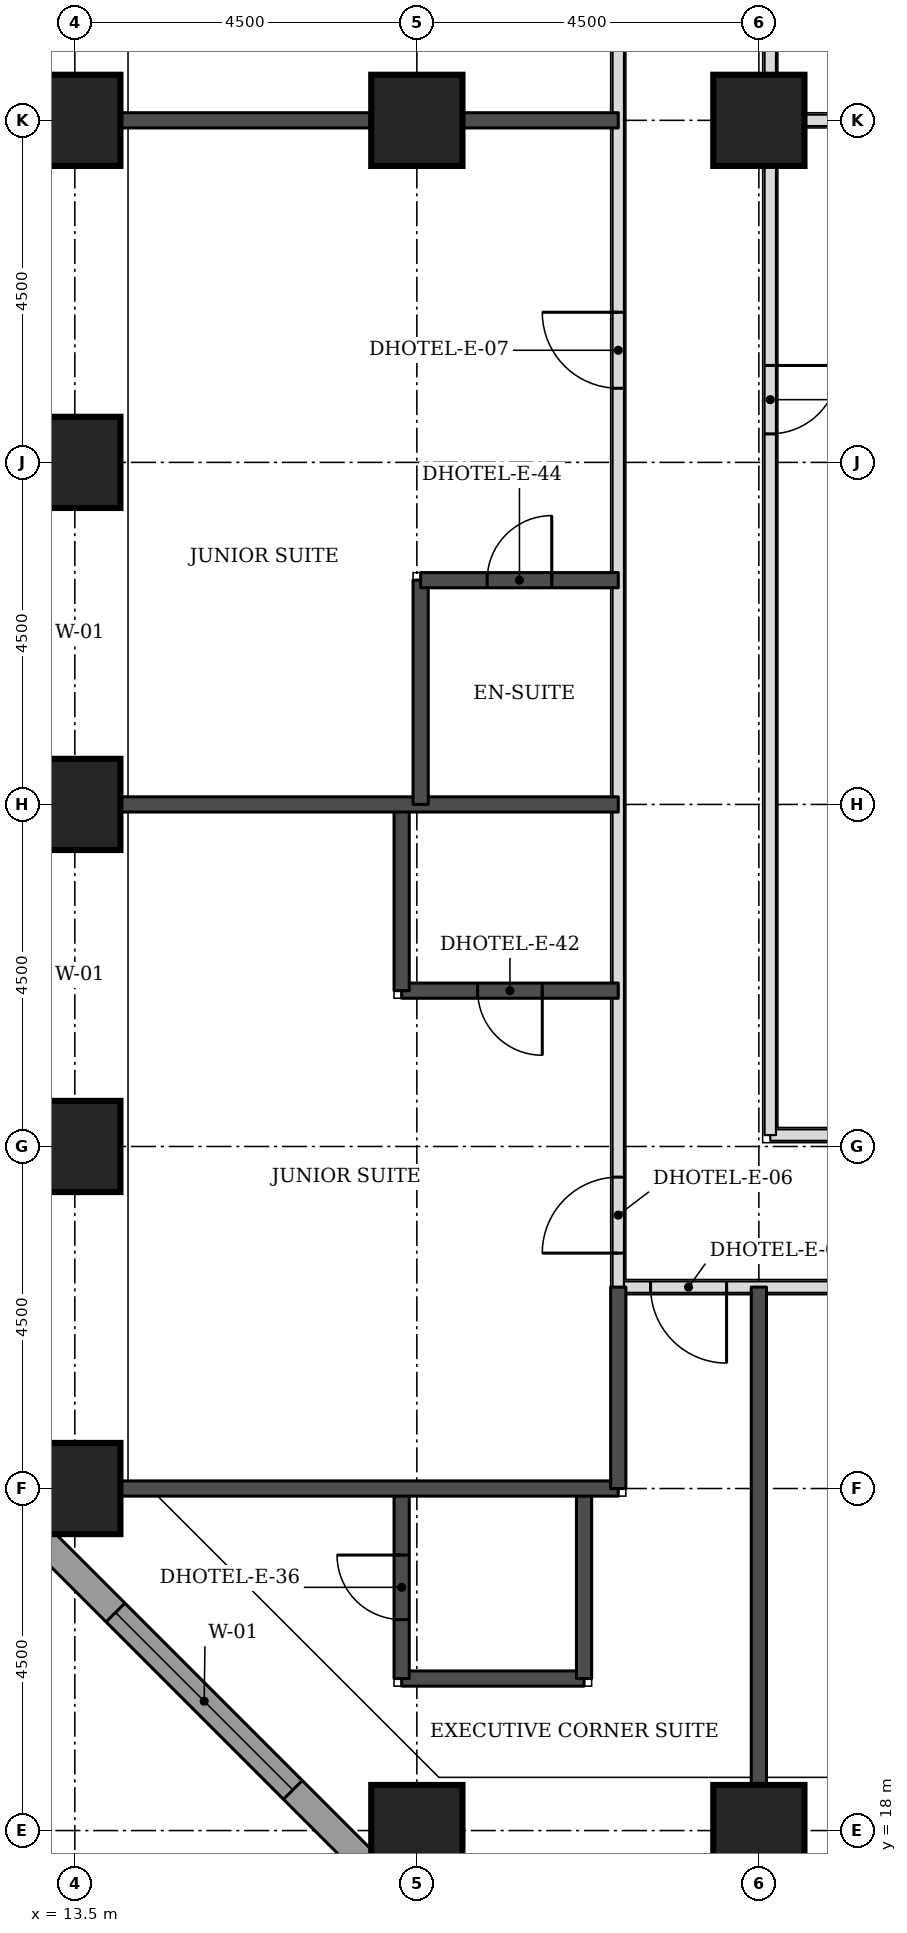
"""IFC4 building model, lengths in metres.
Left out: names, types, materials, properties, quantities, classifications, styles, units other than length and angle.
Written with IfcOpenShell. Run it as: python <this file> out.ifc"""

import sys

from ifc_helpers import new_model, si_unit, direction, frame, frame_2d, origin, origin_2d, place, context, subcontext, project, spatial, rectangle, extrude, element, fill, save


model = new_model("IFC4")
c1 = context("Model", 3, precision=1e-05, world=origin(), true_north=direction((0.0, 1.0)))
c2 = subcontext(c1, "Body", "Model", "MODEL_VIEW")
j1 = project(units=[si_unit("LENGTHUNIT", "METRE"), si_unit("PLANEANGLEUNIT", "RADIAN")], contexts=[c1])
p1 = place(None, origin())
s1 = spatial("IfcSite", under=j1, at=p1, CompositionType="ELEMENT")
p2 = place(p1, origin())
s2 = spatial("IfcBuilding", under=s1, at=p2, CompositionType="ELEMENT")
p3 = place(p2, frame((0.0, 0.0, 39.6)))
s3 = spatial("IfcBuildingStorey", under=s2, at=p3, CompositionType="ELEMENT", Elevation=39.6)
for number, where, z_axis, x_axis in (
    (1, (18.0, 18.0, 0.0), (0.0, 0.0, 1.0), (1.0, 0.0, 0.0)),
    (2, (22.5, 18.0, 0.0), (0.0, 0.0, 1.0), (1.0, 0.0, 0.0)),
    (3, (13.5, 22.5, 0.0), (0.0, 0.0, 1.0), (1.0, 0.0, 0.0)),
    (4, (13.5, 27.0, 0.0), (0.0, 0.0, 1.0), (1.0, 0.0, 0.0)),
    (5, (13.5, 31.5, 0.0), (0.0, 0.0, 1.0), (1.0, 0.0, 0.0)),
    (6, (13.5, 36.0, 0.0), (0.0, 0.0, 1.0), (1.0, 0.0, 0.0)),
    (7, (13.5, 40.5, 0.0), (0.0, 0.0, 1.0), (1.0, 0.0, 0.0)),
    (8, (18.0, 40.5, 0.0), (0.0, 0.0, 1.0), (1.0, 0.0, 0.0)),
    (9, (22.5, 40.5, 0.0), (0.0, 0.0, 1.0), (1.0, 0.0, 0.0)),
):
    element("IfcColumn", number, at=place(p3, frame(where, z_axis=z_axis, x_axis=x_axis)), inside=s3, PredefinedType="COLUMN", context=c2, shape_type="SweptSolid", body=[
        extrude(rectangle(XDim=1.2, YDim=1.2, at=origin_2d()), origin(), (0.0, 0.0, 1.0), 3.3),
    ])
p4 = place(p3, frame((12.674, 22.23, 0.0), z_axis=(0.0, 0.0, 1.0), x_axis=(0.707106781187, -0.707106781187, 0.0)))
e10 = element("IfcWall", 10, at=p4, inside=s3, PredefinedType="STANDARD", context=c2, shape_type="SweptSolid", body=[
    extrude(rectangle(XDim=7.151, YDim=0.35, at=frame_2d((3.576, 0.0))), origin(), (0.0, 0.0, 1.0), 3.055),
])
p5 = place(p4, frame((1.926, 0.0, 0.8)))
e11 = element("IfcOpeningElement", 11, at=p5, cuts=e10, PredefinedType="OPENING", context=c2, shape_type="SweptSolid", body=[
    extrude(rectangle(XDim=3.3, YDim=1.5, at=frame_2d((1.65, 0.75))), frame((0.0, 0.185, 0.0), z_axis=(0.0, -1.0, 0.0), x_axis=(1.0, 0.0, 0.0)), (0.0, 0.0, 1.0), 0.37),
])
p6 = place(p3, frame((20.65, 25.15, 0.0), z_axis=(0.0, 0.0, 1.0), x_axis=(1.0, 0.0, 0.0)))
e12 = element("IfcWall", 12, at=p6, inside=s3, PredefinedType="PARTITIONING", context=c2, shape_type="SweptSolid", body=[
    extrude(rectangle(XDim=32.2, YDim=0.15, at=frame_2d((16.1, 0.0))), origin(), (0.0, 0.0, 1.0), 3.08),
])
p7 = place(p6, frame((4.375, 0.0, 0.0)))
e13 = element("IfcOpeningElement", 13, at=p7, cuts=e12, PredefinedType="OPENING", context=c2, shape_type="SweptSolid", body=[
    extrude(rectangle(XDim=1.0, YDim=2.1, at=frame_2d((0.5, 1.05))), frame((0.0, 0.085, 0.0), z_axis=(0.0, -1.0, 0.0), x_axis=(1.0, 0.0, 0.0)), (0.0, 0.0, 1.0), 0.17),
])
p8 = place(p6, frame((16.075, 0.0, 0.0)))
e14 = element("IfcOpeningElement", 14, at=p8, cuts=e12, PredefinedType="OPENING", context=c2, shape_type="SweptSolid", body=[
    extrude(rectangle(XDim=1.0, YDim=2.1, at=frame_2d((0.5, 1.05))), frame((0.0, 0.085, 0.0), z_axis=(0.0, -1.0, 0.0), x_axis=(1.0, 0.0, 0.0)), (0.0, 0.0, 1.0), 0.17),
])
p9 = place(p6, frame((22.375, 0.0, 0.0)))
e15 = element("IfcOpeningElement", 15, at=p9, cuts=e12, PredefinedType="OPENING", context=c2, shape_type="SweptSolid", body=[
    extrude(rectangle(XDim=1.0, YDim=2.1, at=frame_2d((0.5, 1.05))), frame((0.0, 0.085, 0.0), z_axis=(0.0, -1.0, 0.0), x_axis=(1.0, 0.0, 0.0)), (0.0, 0.0, 1.0), 0.17),
])
p10 = place(p6, frame((0.425, 0.0, 0.0)))
e16 = element("IfcOpeningElement", 16, at=p10, cuts=e12, PredefinedType="OPENING", context=c2, shape_type="SweptSolid", body=[
    extrude(rectangle(XDim=1.0, YDim=2.1, at=frame_2d((0.5, 1.05))), frame((0.0, 0.085, 0.0), z_axis=(0.0, -1.0, 0.0), x_axis=(1.0, 0.0, 0.0)), (0.0, 0.0, 1.0), 0.17),
])
p11 = place(p6, frame((30.025, 0.0, 0.0)))
e17 = element("IfcOpeningElement", 17, at=p11, cuts=e12, PredefinedType="OPENING", context=c2, shape_type="SweptSolid", body=[
    extrude(rectangle(XDim=1.0, YDim=2.1, at=frame_2d((0.5, 1.05))), frame((0.0, 0.085, 0.0), z_axis=(0.0, -1.0, 0.0), x_axis=(1.0, 0.0, 0.0)), (0.0, 0.0, 1.0), 0.17),
])
p12 = place(p3, frame((20.65, 25.15, 0.0), z_axis=(0.0, 0.0, 1.0), x_axis=(0.0, 1.0, 0.0)))
e18 = element("IfcWall", 18, at=p12, inside=s3, PredefinedType="PARTITIONING", context=c2, shape_type="SweptSolid", body=[
    extrude(rectangle(XDim=24.35, YDim=0.15, at=frame_2d((12.175, 0.0))), origin(), (0.0, 0.0, 1.0), 3.08),
])
p13 = place(p12, frame((0.447, 0.0, 0.0)))
e19 = element("IfcOpeningElement", 19, at=p13, cuts=e18, PredefinedType="OPENING", context=c2, shape_type="SweptSolid", body=[
    extrude(rectangle(XDim=1.0, YDim=2.1, at=frame_2d((0.5, 1.05))), frame((0.0, 0.085, 0.0), z_axis=(0.0, -1.0, 0.0), x_axis=(1.0, 0.0, 0.0)), (0.0, 0.0, 1.0), 0.17),
])
p14 = place(p12, frame((11.825, 0.0, 0.0)))
e20 = element("IfcOpeningElement", 20, at=p14, cuts=e18, PredefinedType="OPENING", context=c2, shape_type="SweptSolid", body=[
    extrude(rectangle(XDim=1.0, YDim=2.1, at=frame_2d((0.5, 1.05))), frame((0.0, 0.085, 0.0), z_axis=(0.0, -1.0, 0.0), x_axis=(1.0, 0.0, 0.0)), (0.0, 0.0, 1.0), 0.17),
])
p15 = place(p12, frame((18.125, 0.0, 0.0)))
e21 = element("IfcOpeningElement", 21, at=p15, cuts=e18, PredefinedType="OPENING", context=c2, shape_type="SweptSolid", body=[
    extrude(rectangle(XDim=1.0, YDim=2.1, at=frame_2d((0.5, 1.05))), frame((0.0, 0.085, 0.0), z_axis=(0.0, -1.0, 0.0), x_axis=(1.0, 0.0, 0.0)), (0.0, 0.0, 1.0), 0.17),
])
p16 = place(p3, frame((22.65, 27.15, 0.0), z_axis=(0.0, 0.0, 1.0), x_axis=(1.0, 0.0, 0.0)))
e22 = element("IfcWall", 22, at=p16, inside=s3, PredefinedType="PARTITIONING", context=c2, shape_type="SweptSolid", body=[
    extrude(rectangle(XDim=1.95, YDim=0.15, at=frame_2d((0.975, 0.0))), origin(), (0.0, 0.0, 1.0), 3.08),
])
p17 = place(p3, frame((22.65, 27.15, 0.0), z_axis=(0.0, 0.0, 1.0), x_axis=(0.0, 1.0, 0.0)))
e23 = element("IfcWall", 23, at=p17, inside=s3, PredefinedType="PARTITIONING", context=c2, shape_type="SweptSolid", body=[
    extrude(rectangle(XDim=15.85, YDim=0.15, at=frame_2d((7.925, 0.0))), origin(), (0.0, 0.0, 1.0), 3.08),
])
p18 = place(p17, frame((9.225, 0.0, 0.0)))
e24 = element("IfcOpeningElement", 24, at=p18, cuts=e23, PredefinedType="OPENING", context=c2, shape_type="SweptSolid", body=[
    extrude(rectangle(XDim=0.9, YDim=2.1, at=frame_2d((0.45, 1.05))), frame((0.0, 0.085, 0.0), z_axis=(0.0, -1.0, 0.0), x_axis=(1.0, 0.0, 0.0)), (0.0, 0.0, 1.0), 0.17),
])
p19 = place(p3, frame((22.5, 18.6, 0.0), z_axis=(0.0, 0.0, 1.0), x_axis=(0.0, 1.0, 0.0)))
e25 = element("IfcWall", 25, at=p19, inside=s3, PredefinedType="SOLIDWALL", context=c2, shape_type="SweptSolid", body=[
    extrude(rectangle(XDim=6.55, YDim=0.2, at=frame_2d((3.275, 0.0))), origin(), (0.0, 0.0, 1.0), 3.08),
])
p20 = place(p3, frame((17.8, 20.0, 0.0), z_axis=(0.0, 0.0, 1.0), x_axis=(1.0, 0.0, 0.0)))
e26 = element("IfcWall", 26, at=p20, inside=s3, PredefinedType="SOLIDWALL", context=c2, shape_type="SweptSolid", body=[
    extrude(rectangle(XDim=2.4, YDim=0.2, at=frame_2d((1.2, 0.0))), origin(), (0.0, 0.0, 1.0), 3.08),
])
p21 = place(p3, frame((17.8, 20.0, 0.0), z_axis=(0.0, 0.0, 1.0), x_axis=(0.0, 1.0, 0.0)))
e27 = element("IfcWall", 27, at=p21, inside=s3, PredefinedType="SOLIDWALL", context=c2, shape_type="SweptSolid", body=[
    extrude(rectangle(XDim=2.5, YDim=0.2, at=frame_2d((1.25, 0.0))), origin(), (0.0, 0.0, 1.0), 3.08),
])
p22 = place(p21, frame((0.775, 0.0, 0.0)))
e28 = element("IfcOpeningElement", 28, at=p22, cuts=e27, PredefinedType="OPENING", context=c2, shape_type="SweptSolid", body=[
    extrude(rectangle(XDim=0.85, YDim=2.1, at=frame_2d((0.425, 1.05))), frame((0.0, 0.11, 0.0), z_axis=(0.0, -1.0, 0.0), x_axis=(1.0, 0.0, 0.0)), (0.0, 0.0, 1.0), 0.22),
])
p23 = place(p3, frame((20.2, 20.0, 0.0), z_axis=(0.0, 0.0, 1.0), x_axis=(0.0, 1.0, 0.0)))
e29 = element("IfcWall", 29, at=p23, inside=s3, PredefinedType="SOLIDWALL", context=c2, shape_type="SweptSolid", body=[
    extrude(rectangle(XDim=2.5, YDim=0.2, at=frame_2d((1.25, 0.0))), origin(), (0.0, 0.0, 1.0), 3.08),
])
p24 = place(p3, frame((14.1, 22.5, 0.0), z_axis=(0.0, 0.0, 1.0), x_axis=(1.0, 0.0, 0.0)))
e30 = element("IfcWall", 30, at=p24, inside=s3, PredefinedType="SOLIDWALL", context=c2, shape_type="SweptSolid", body=[
    extrude(rectangle(XDim=6.55, YDim=0.2, at=frame_2d((3.275, 0.0))), origin(), (0.0, 0.0, 1.0), 3.08),
])
p25 = place(p3, frame((20.65, 22.5, 0.0), z_axis=(0.0, 0.0, 1.0), x_axis=(0.0, 1.0, 0.0)))
e31 = element("IfcWall", 31, at=p25, inside=s3, PredefinedType="SOLIDWALL", context=c2, shape_type="SweptSolid", body=[
    extrude(rectangle(XDim=2.65, YDim=0.2, at=frame_2d((1.325, 0.0))), origin(), (0.0, 0.0, 1.0), 3.08),
])
p26 = place(p3, frame((17.8, 29.05, 0.0), z_axis=(0.0, 0.0, 1.0), x_axis=(1.0, 0.0, 0.0)))
e32 = element("IfcWall", 32, at=p26, inside=s3, PredefinedType="SOLIDWALL", context=c2, shape_type="SweptSolid", body=[
    extrude(rectangle(XDim=2.85, YDim=0.2, at=frame_2d((1.425, 0.0))), origin(), (0.0, 0.0, 1.0), 3.08),
])
p27 = place(p26, frame((1.0, 0.0, 0.0)))
e33 = element("IfcOpeningElement", 33, at=p27, cuts=e32, PredefinedType="OPENING", context=c2, shape_type="SweptSolid", body=[
    extrude(rectangle(XDim=0.85, YDim=2.1, at=frame_2d((0.425, 1.05))), frame((0.0, 0.11, 0.0), z_axis=(0.0, -1.0, 0.0), x_axis=(1.0, 0.0, 0.0)), (0.0, 0.0, 1.0), 0.22),
])
p28 = place(p3, frame((17.8, 29.05, 0.0), z_axis=(0.0, 0.0, 1.0), x_axis=(0.0, 1.0, 0.0)))
e34 = element("IfcWall", 34, at=p28, inside=s3, PredefinedType="SOLIDWALL", context=c2, shape_type="SweptSolid", body=[
    extrude(rectangle(XDim=2.45, YDim=0.2, at=frame_2d((1.225, 0.0))), origin(), (0.0, 0.0, 1.0), 3.08),
])
p29 = place(p3, frame((14.1, 31.5, 0.0), z_axis=(0.0, 0.0, 1.0), x_axis=(1.0, 0.0, 0.0)))
e35 = element("IfcWall", 35, at=p29, inside=s3, PredefinedType="SOLIDWALL", context=c2, shape_type="SweptSolid", body=[
    extrude(rectangle(XDim=6.55, YDim=0.2, at=frame_2d((3.275, 0.0))), origin(), (0.0, 0.0, 1.0), 3.08),
])
p30 = place(p3, frame((18.05, 31.5, 0.0), z_axis=(0.0, 0.0, 1.0), x_axis=(0.0, 1.0, 0.0)))
e36 = element("IfcWall", 36, at=p30, inside=s3, PredefinedType="SOLIDWALL", context=c2, shape_type="SweptSolid", body=[
    extrude(rectangle(XDim=2.95, YDim=0.2, at=frame_2d((1.475, 0.0))), origin(), (0.0, 0.0, 1.0), 3.08),
])
p31 = place(p3, frame((18.05, 34.45, 0.0), z_axis=(0.0, 0.0, 1.0), x_axis=(1.0, 0.0, 0.0)))
e37 = element("IfcWall", 37, at=p31, inside=s3, PredefinedType="SOLIDWALL", context=c2, shape_type="SweptSolid", body=[
    extrude(rectangle(XDim=2.6, YDim=0.2, at=frame_2d((1.3, 0.0))), origin(), (0.0, 0.0, 1.0), 3.08),
])
p32 = place(p31, frame((0.875, 0.0, 0.0)))
e38 = element("IfcOpeningElement", 38, at=p32, cuts=e37, PredefinedType="OPENING", context=c2, shape_type="SweptSolid", body=[
    extrude(rectangle(XDim=0.85, YDim=2.1, at=frame_2d((0.425, 1.05))), frame((0.0, 0.11, 0.0), z_axis=(0.0, -1.0, 0.0), x_axis=(1.0, 0.0, 0.0)), (0.0, 0.0, 1.0), 0.22),
])
p33 = place(p3, frame((14.1, 40.5, 0.0), z_axis=(0.0, 0.0, 1.0), x_axis=(1.0, 0.0, 0.0)))
e39 = element("IfcWall", 39, at=p33, inside=s3, PredefinedType="SOLIDWALL", context=c2, shape_type="SweptSolid", body=[
    extrude(rectangle(XDim=6.55, YDim=0.2, at=frame_2d((3.275, 0.0))), origin(), (0.0, 0.0, 1.0), 3.08),
])
p34 = place(p3, frame((22.65, 40.5, 0.0), z_axis=(0.0, 0.0, 1.0), x_axis=(1.0, 0.0, 0.0)))
e40 = element("IfcWall", 40, at=p34, inside=s3, PredefinedType="PARTITIONING", context=c2, shape_type="SweptSolid", body=[
    extrude(rectangle(XDim=1.95, YDim=0.15, at=frame_2d((0.975, 0.0))), origin(), (0.0, 0.0, 1.0), 2.33),
])
p35 = place(p5, origin())
e41 = element("IfcWindow", 41, at=p35, inside=s3, PartitioningType="SINGLE_PANEL", PredefinedType="WINDOW", context=c2, shape_type="SweptSolid", body=[
    extrude(rectangle(XDim=3.3, YDim=1.5, at=frame_2d((1.65, 0.75))), frame((0.0, 0.085, 0.0), z_axis=(0.0, -1.0, 0.0), x_axis=(1.0, 0.0, 0.0)), (0.0, 0.0, 1.0), 0.06),
])
fill(e11, e41)
p36 = place(p13, origin())
e42 = element("IfcDoor", 42, at=p36, inside=s3, OperationType="SINGLE_SWING_LEFT", PredefinedType="DOOR", context=c2, shape_type="SweptSolid", body=[
    extrude(rectangle(XDim=1.0, YDim=2.1, at=frame_2d((0.5, 1.05))), frame((0.0, 0.025, 0.0), z_axis=(0.0, -1.0, 0.0), x_axis=(1.0, 0.0, 0.0)), (0.0, 0.0, 1.0), 0.05),
])
fill(e19, e42)
p37 = place(p27, frame((0.85, 0.0, 0.0), z_axis=(0.0, 0.0, 1.0), x_axis=(-1.0, 0.0, 0.0)))
e43 = element("IfcDoor", 43, at=p37, inside=s3, OperationType="SINGLE_SWING_LEFT", PredefinedType="DOOR", context=c2, shape_type="SweptSolid", body=[
    extrude(rectangle(XDim=0.85, YDim=2.1, at=frame_2d((0.425, 1.05))), frame((0.0, 0.025, 0.0), z_axis=(0.0, -1.0, 0.0), x_axis=(1.0, 0.0, 0.0)), (0.0, 0.0, 1.0), 0.05),
])
fill(e33, e43)
p38 = place(p14, origin())
e44 = element("IfcDoor", 44, at=p38, inside=s3, OperationType="SINGLE_SWING_RIGHT", PredefinedType="DOOR", context=c2, shape_type="SweptSolid", body=[
    extrude(rectangle(XDim=1.0, YDim=2.1, at=frame_2d((0.5, 1.05))), frame((0.0, 0.025, 0.0), z_axis=(0.0, -1.0, 0.0), x_axis=(1.0, 0.0, 0.0)), (0.0, 0.0, 1.0), 0.05),
])
fill(e20, e44)
p39 = place(p32, origin())
e45 = element("IfcDoor", 45, at=p39, inside=s3, OperationType="SINGLE_SWING_RIGHT", PredefinedType="DOOR", context=c2, shape_type="SweptSolid", body=[
    extrude(rectangle(XDim=0.85, YDim=2.1, at=frame_2d((0.425, 1.05))), frame((0.0, 0.025, 0.0), z_axis=(0.0, -1.0, 0.0), x_axis=(1.0, 0.0, 0.0)), (0.0, 0.0, 1.0), 0.05),
])
fill(e38, e45)
p40 = place(p10, frame((1.0, 0.0, 0.0), z_axis=(0.0, 0.0, 1.0), x_axis=(-1.0, 0.0, 0.0)))
e46 = element("IfcDoor", 46, at=p40, inside=s3, OperationType="SINGLE_SWING_LEFT", PredefinedType="DOOR", context=c2, shape_type="SweptSolid", body=[
    extrude(rectangle(XDim=1.0, YDim=2.1, at=frame_2d((0.5, 1.05))), frame((0.0, 0.025, 0.0), z_axis=(0.0, -1.0, 0.0), x_axis=(1.0, 0.0, 0.0)), (0.0, 0.0, 1.0), 0.05),
])
fill(e16, e46)
p41 = place(p22, origin())
e47 = element("IfcDoor", 47, at=p41, inside=s3, OperationType="SINGLE_SWING_RIGHT", PredefinedType="DOOR", context=c2, shape_type="SweptSolid", body=[
    extrude(rectangle(XDim=0.85, YDim=2.1, at=frame_2d((0.425, 1.05))), frame((0.0, 0.025, 0.0), z_axis=(0.0, -1.0, 0.0), x_axis=(1.0, 0.0, 0.0)), (0.0, 0.0, 1.0), 0.05),
])
fill(e28, e47)
p42 = place(p18, frame((0.9, 0.0, 0.0), z_axis=(0.0, 0.0, 1.0), x_axis=(-1.0, 0.0, 0.0)))
e48 = element("IfcDoor", 48, at=p42, inside=s3, OperationType="SINGLE_SWING_LEFT", PredefinedType="DOOR", context=c2, shape_type="SweptSolid", body=[
    extrude(rectangle(XDim=0.9, YDim=2.1, at=frame_2d((0.45, 1.05))), frame((0.0, 0.025, 0.0), z_axis=(0.0, -1.0, 0.0), x_axis=(1.0, 0.0, 0.0)), (0.0, 0.0, 1.0), 0.05),
])
fill(e24, e48)
save(model, sys.argv[1])
